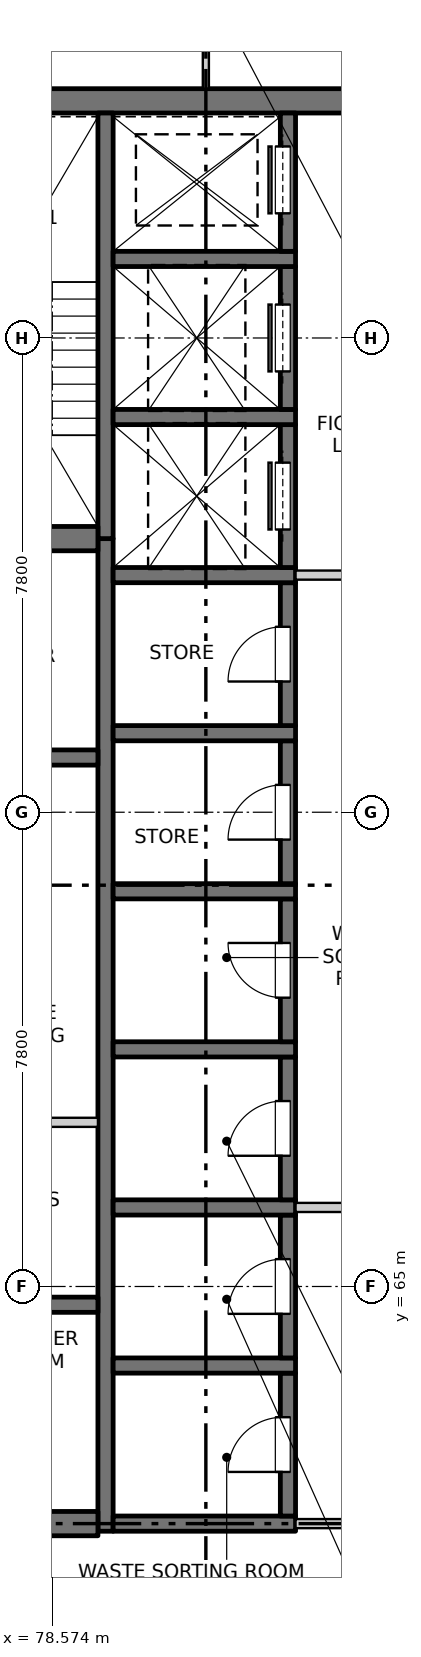
"""IFC4 building model, lengths in metres.
Left out: names, types, materials, properties, quantities, classifications, styles, units other than length and angle.
Written with IfcOpenShell. Run it as: python <this file> out.ifc"""

import sys

from ifc_helpers import new_model, si_unit, direction, frame, frame_2d, origin, place, context, subcontext, project, spatial, rectangle, extrude, element, fill, save


model = new_model("IFC4")
c1 = context("Model", 3, precision=1e-05, world=origin(), true_north=direction((0.0, 1.0)))
c2 = subcontext(c1, "Body", "Model", "MODEL_VIEW")
j1 = project(units=[si_unit("LENGTHUNIT", "METRE"), si_unit("PLANEANGLEUNIT", "RADIAN")], contexts=[c1])
p1 = place(None, origin())
s1 = spatial("IfcSite", under=j1, at=p1, CompositionType="ELEMENT")
p2 = place(p1, origin())
s2 = spatial("IfcBuilding", under=s1, at=p2, CompositionType="ELEMENT")
p3 = place(p2, frame((0.0, 0.0, 224.5)))
s3 = spatial("IfcBuildingStorey", under=s2, at=p3, CompositionType="ELEMENT", Elevation=224.5)
p4 = place(p3, frame((75.45, 84.5, -0.25), z_axis=(0.0, 0.0, 1.0), x_axis=(1.0, 0.0, 0.0)))
e1 = element("IfcWall", 1, at=p4, inside=s3, PredefinedType="SOLIDWALL", context=c2, shape_type="SweptSolid", body=[
    extrude(rectangle(XDim=19.1, YDim=0.4, at=frame_2d((9.55, 0.0))), origin(), (0.0, 0.0, 1.0), 3.4),
])
p5 = place(p3, frame((79.45, 60.975, -0.25), z_axis=(0.0, 0.0, 1.0), x_axis=(0.0, 1.0, 0.0)))
e2 = element("IfcWall", 2, at=p5, inside=s3, PredefinedType="SOLIDWALL", context=c2, shape_type="SweptSolid", body=[
    extrude(rectangle(XDim=16.325, YDim=0.25, at=frame_2d((8.163, 0.0))), origin(), (0.0, 0.0, 1.0), 3.4),
])
p6 = place(p3, frame((79.45, 77.3, -0.25), z_axis=(0.0, 0.0, 1.0), x_axis=(0.0, 1.0, 0.0)))
e3 = element("IfcWall", 3, at=p6, inside=s3, PredefinedType="SOLIDWALL", context=c2, shape_type="SweptSolid", body=[
    extrude(rectangle(XDim=7.0, YDim=0.25, at=frame_2d((3.5, 0.0))), origin(), (0.0, 0.0, 1.0), 3.4),
])
p7 = place(p3, frame((79.575, 61.1, -0.25), z_axis=(0.0, 0.0, 1.0), x_axis=(1.0, 0.0, 0.0)))
e4 = element("IfcWall", 4, at=p7, inside=s3, PredefinedType="SOLIDWALL", context=c2, shape_type="SweptSolid", body=[
    extrude(rectangle(XDim=3.0, YDim=0.25, at=frame_2d((1.5, 0.0))), origin(), (0.0, 0.0, 1.0), 3.4),
])
p8 = place(p3, frame((82.45, 61.225, -0.25), z_axis=(0.0, 0.0, 1.0), x_axis=(0.0, 1.0, 0.0)))
e5 = element("IfcWall", 5, at=p8, inside=s3, PredefinedType="SOLIDWALL", context=c2, shape_type="SweptSolid", body=[
    extrude(rectangle(XDim=2.35, YDim=0.25, at=frame_2d((1.175, 0.0))), origin(), (0.0, 0.0, 1.0), 3.4),
])
p9 = place(p8, frame((0.725, 0.0, 0.25)))
e6 = element("IfcOpeningElement", 6, at=p9, cuts=e5, PredefinedType="OPENING", context=c2, shape_type="SweptSolid", body=[
    extrude(rectangle(XDim=0.9, YDim=2.1, at=frame_2d((0.45, 1.05))), frame((0.0, 0.135, 0.0), z_axis=(0.0, -1.0, 0.0), x_axis=(1.0, 0.0, 0.0)), (0.0, 0.0, 1.0), 0.27),
])
p10 = place(p3, frame((79.575, 63.7, -0.25), z_axis=(0.0, 0.0, 1.0), x_axis=(1.0, 0.0, 0.0)))
e7 = element("IfcWall", 7, at=p10, inside=s3, PredefinedType="SOLIDWALL", context=c2, shape_type="SweptSolid", body=[
    extrude(rectangle(XDim=3.0, YDim=0.25, at=frame_2d((1.5, 0.0))), origin(), (0.0, 0.0, 1.0), 3.4),
])
p11 = place(p3, frame((82.45, 63.825, -0.25), z_axis=(0.0, 0.0, 1.0), x_axis=(0.0, 1.0, 0.0)))
e8 = element("IfcWall", 8, at=p11, inside=s3, PredefinedType="SOLIDWALL", context=c2, shape_type="SweptSolid", body=[
    extrude(rectangle(XDim=2.35, YDim=0.25, at=frame_2d((1.175, 0.0))), origin(), (0.0, 0.0, 1.0), 3.4),
])
p12 = place(p11, frame((0.725, 0.0, 0.25)))
e9 = element("IfcOpeningElement", 9, at=p12, cuts=e8, PredefinedType="OPENING", context=c2, shape_type="SweptSolid", body=[
    extrude(rectangle(XDim=0.9, YDim=2.1, at=frame_2d((0.45, 1.05))), frame((0.0, 0.135, 0.0), z_axis=(0.0, -1.0, 0.0), x_axis=(1.0, 0.0, 0.0)), (0.0, 0.0, 1.0), 0.27),
])
p13 = place(p3, frame((79.575, 66.3, -0.25), z_axis=(0.0, 0.0, 1.0), x_axis=(1.0, 0.0, 0.0)))
e10 = element("IfcWall", 10, at=p13, inside=s3, PredefinedType="SOLIDWALL", context=c2, shape_type="SweptSolid", body=[
    extrude(rectangle(XDim=3.0, YDim=0.25, at=frame_2d((1.5, 0.0))), origin(), (0.0, 0.0, 1.0), 3.4),
])
p14 = place(p3, frame((82.45, 66.425, -0.25), z_axis=(0.0, 0.0, 1.0), x_axis=(0.0, 1.0, 0.0)))
e11 = element("IfcWall", 11, at=p14, inside=s3, PredefinedType="SOLIDWALL", context=c2, shape_type="SweptSolid", body=[
    extrude(rectangle(XDim=2.35, YDim=0.25, at=frame_2d((1.175, 0.0))), origin(), (0.0, 0.0, 1.0), 3.4),
])
p15 = place(p14, frame((0.725, 0.0, 0.25)))
e12 = element("IfcOpeningElement", 12, at=p15, cuts=e11, PredefinedType="OPENING", context=c2, shape_type="SweptSolid", body=[
    extrude(rectangle(XDim=0.9, YDim=2.1, at=frame_2d((0.45, 1.05))), frame((0.0, 0.135, 0.0), z_axis=(0.0, -1.0, 0.0), x_axis=(1.0, 0.0, 0.0)), (0.0, 0.0, 1.0), 0.27),
])
p16 = place(p3, frame((79.575, 68.9, -0.25), z_axis=(0.0, 0.0, 1.0), x_axis=(1.0, 0.0, 0.0)))
e13 = element("IfcWall", 13, at=p16, inside=s3, PredefinedType="SOLIDWALL", context=c2, shape_type="SweptSolid", body=[
    extrude(rectangle(XDim=3.0, YDim=0.25, at=frame_2d((1.5, 0.0))), origin(), (0.0, 0.0, 1.0), 3.4),
])
p17 = place(p3, frame((82.45, 69.025, -0.25), z_axis=(0.0, 0.0, 1.0), x_axis=(0.0, 1.0, 0.0)))
e14 = element("IfcWall", 14, at=p17, inside=s3, PredefinedType="SOLIDWALL", context=c2, shape_type="SweptSolid", body=[
    extrude(rectangle(XDim=2.35, YDim=0.25, at=frame_2d((1.175, 0.0))), origin(), (0.0, 0.0, 1.0), 3.4),
])
p18 = place(p17, frame((0.725, 0.0, 0.25)))
e15 = element("IfcOpeningElement", 15, at=p18, cuts=e14, PredefinedType="OPENING", context=c2, shape_type="SweptSolid", body=[
    extrude(rectangle(XDim=0.9, YDim=2.1, at=frame_2d((0.45, 1.05))), frame((0.0, 0.135, 0.0), z_axis=(0.0, -1.0, 0.0), x_axis=(1.0, 0.0, 0.0)), (0.0, 0.0, 1.0), 0.27),
])
p19 = place(p3, frame((79.575, 71.5, -0.25), z_axis=(0.0, 0.0, 1.0), x_axis=(1.0, 0.0, 0.0)))
e16 = element("IfcWall", 16, at=p19, inside=s3, PredefinedType="SOLIDWALL", context=c2, shape_type="SweptSolid", body=[
    extrude(rectangle(XDim=3.0, YDim=0.25, at=frame_2d((1.5, 0.0))), origin(), (0.0, 0.0, 1.0), 3.4),
])
p20 = place(p3, frame((82.45, 71.625, -0.25), z_axis=(0.0, 0.0, 1.0), x_axis=(0.0, 1.0, 0.0)))
e17 = element("IfcWall", 17, at=p20, inside=s3, PredefinedType="SOLIDWALL", context=c2, shape_type="SweptSolid", body=[
    extrude(rectangle(XDim=2.35, YDim=0.25, at=frame_2d((1.175, 0.0))), origin(), (0.0, 0.0, 1.0), 3.4),
])
p21 = place(p20, frame((0.725, 0.0, 0.25)))
e18 = element("IfcOpeningElement", 18, at=p21, cuts=e17, PredefinedType="OPENING", context=c2, shape_type="SweptSolid", body=[
    extrude(rectangle(XDim=0.9, YDim=2.1, at=frame_2d((0.45, 1.05))), frame((0.0, 0.135, 0.0), z_axis=(0.0, -1.0, 0.0), x_axis=(1.0, 0.0, 0.0)), (0.0, 0.0, 1.0), 0.27),
])
p22 = place(p3, frame((79.575, 74.1, -0.25), z_axis=(0.0, 0.0, 1.0), x_axis=(1.0, 0.0, 0.0)))
e19 = element("IfcWall", 19, at=p22, inside=s3, PredefinedType="SOLIDWALL", context=c2, shape_type="SweptSolid", body=[
    extrude(rectangle(XDim=3.0, YDim=0.25, at=frame_2d((1.5, 0.0))), origin(), (0.0, 0.0, 1.0), 3.4),
])
p23 = place(p3, frame((82.45, 74.225, -0.25), z_axis=(0.0, 0.0, 1.0), x_axis=(0.0, 1.0, 0.0)))
e20 = element("IfcWall", 20, at=p23, inside=s3, PredefinedType="SOLIDWALL", context=c2, shape_type="SweptSolid", body=[
    extrude(rectangle(XDim=2.35, YDim=0.25, at=frame_2d((1.175, 0.0))), origin(), (0.0, 0.0, 1.0), 3.4),
])
p24 = place(p23, frame((0.725, 0.0, 0.25)))
e21 = element("IfcOpeningElement", 21, at=p24, cuts=e20, PredefinedType="OPENING", context=c2, shape_type="SweptSolid", body=[
    extrude(rectangle(XDim=0.9, YDim=2.1, at=frame_2d((0.45, 1.05))), frame((0.0, 0.135, 0.0), z_axis=(0.0, -1.0, 0.0), x_axis=(1.0, 0.0, 0.0)), (0.0, 0.0, 1.0), 0.27),
])
p25 = place(p3, frame((79.575, 76.7, -0.25), z_axis=(0.0, 0.0, 1.0), x_axis=(1.0, 0.0, 0.0)))
e22 = element("IfcWall", 22, at=p25, inside=s3, PredefinedType="SOLIDWALL", context=c2, shape_type="SweptSolid", body=[
    extrude(rectangle(XDim=3.0, YDim=0.25, at=frame_2d((1.5, 0.0))), origin(), (0.0, 0.0, 1.0), 3.4),
])
p26 = place(p3, frame((82.45, 76.825, -0.25), z_axis=(0.0, 0.0, 1.0), x_axis=(0.0, 1.0, 0.0)))
e23 = element("IfcWall", 23, at=p26, inside=s3, PredefinedType="SOLIDWALL", context=c2, shape_type="SweptSolid", body=[
    extrude(rectangle(XDim=2.35, YDim=0.25, at=frame_2d((1.175, 0.0))), origin(), (0.0, 0.0, 1.0), 3.4),
])
p27 = place(p26, frame((0.625, 0.0, 0.25)))
e24 = element("IfcOpeningElement", 24, at=p27, cuts=e23, PredefinedType="OPENING", context=c2, shape_type="SweptSolid", body=[
    extrude(rectangle(XDim=1.1, YDim=2.1, at=frame_2d((0.55, 1.05))), frame((0.0, 0.135, 0.0), z_axis=(0.0, -1.0, 0.0), x_axis=(1.0, 0.0, 0.0)), (0.0, 0.0, 1.0), 0.27),
])
p28 = place(p3, frame((79.575, 79.3, -0.25), z_axis=(0.0, 0.0, 1.0), x_axis=(1.0, 0.0, 0.0)))
e25 = element("IfcWall", 25, at=p28, inside=s3, PredefinedType="SOLIDWALL", context=c2, shape_type="SweptSolid", body=[
    extrude(rectangle(XDim=3.0, YDim=0.25, at=frame_2d((1.5, 0.0))), origin(), (0.0, 0.0, 1.0), 3.4),
])
p29 = place(p3, frame((82.45, 79.425, -0.25), z_axis=(0.0, 0.0, 1.0), x_axis=(0.0, 1.0, 0.0)))
e26 = element("IfcWall", 26, at=p29, inside=s3, PredefinedType="SOLIDWALL", context=c2, shape_type="SweptSolid", body=[
    extrude(rectangle(XDim=2.35, YDim=0.25, at=frame_2d((1.175, 0.0))), origin(), (0.0, 0.0, 1.0), 3.4),
])
p30 = place(p29, frame((0.625, 0.0, 0.25)))
e27 = element("IfcOpeningElement", 27, at=p30, cuts=e26, PredefinedType="OPENING", context=c2, shape_type="SweptSolid", body=[
    extrude(rectangle(XDim=1.1, YDim=2.1, at=frame_2d((0.55, 1.05))), frame((0.0, 0.135, 0.0), z_axis=(0.0, -1.0, 0.0), x_axis=(1.0, 0.0, 0.0)), (0.0, 0.0, 1.0), 0.27),
])
p31 = place(p3, frame((79.575, 81.9, -0.25), z_axis=(0.0, 0.0, 1.0), x_axis=(1.0, 0.0, 0.0)))
e28 = element("IfcWall", 28, at=p31, inside=s3, PredefinedType="SOLIDWALL", context=c2, shape_type="SweptSolid", body=[
    extrude(rectangle(XDim=3.0, YDim=0.25, at=frame_2d((1.5, 0.0))), origin(), (0.0, 0.0, 1.0), 3.4),
])
p32 = place(p3, frame((82.45, 82.025, -0.25), z_axis=(0.0, 0.0, 1.0), x_axis=(0.0, 1.0, 0.0)))
e29 = element("IfcWall", 29, at=p32, inside=s3, PredefinedType="SOLIDWALL", context=c2, shape_type="SweptSolid", body=[
    extrude(rectangle(XDim=2.275, YDim=0.25, at=frame_2d((1.138, 0.0))), origin(), (0.0, 0.0, 1.0), 3.4),
])
p33 = place(p32, frame((0.625, 0.0, 0.25)))
e30 = element("IfcOpeningElement", 30, at=p33, cuts=e29, PredefinedType="OPENING", context=c2, shape_type="SweptSolid", body=[
    extrude(rectangle(XDim=1.1, YDim=2.1, at=frame_2d((0.55, 1.05))), frame((0.0, 0.135, 0.0), z_axis=(0.0, -1.0, 0.0), x_axis=(1.0, 0.0, 0.0)), (0.0, 0.0, 1.0), 0.27),
])
p34 = place(p3, frame((75.45, 61.1, -0.25), z_axis=(0.0, 0.0, 1.0), x_axis=(1.0, 0.0, 0.0)))
e31 = element("IfcWall", 31, at=p34, inside=s3, PredefinedType="SOLIDWALL", context=c2, shape_type="SweptSolid", body=[
    extrude(rectangle(XDim=3.875, YDim=0.4, at=frame_2d((1.938, 0.0))), origin(), (0.0, 0.0, 1.0), 3.4),
])
for number, where, z_axis, x_axis in (
    (32, (75.45, 64.7, -0.25), (0.0, 0.0, 1.0), (1.0, 0.0, 0.0)),
    (33, (75.45, 73.7, -0.25), (0.0, 0.0, 1.0), (1.0, 0.0, 0.0)),
):
    element("IfcWall", number, at=place(p3, frame(where, z_axis=z_axis, x_axis=x_axis)), inside=s3, PredefinedType="SOLIDWALL", context=c2, shape_type="SweptSolid", body=[
        extrude(rectangle(XDim=3.875, YDim=0.25, at=frame_2d((1.938, 0.0))), origin(), (0.0, 0.0, 1.0), 3.4),
    ])
p35 = place(p3, frame((75.45, 77.3, -0.25), z_axis=(0.0, 0.0, 1.0), x_axis=(1.0, 0.0, 0.0)))
e34 = element("IfcWall", 34, at=p35, inside=s3, PredefinedType="SOLIDWALL", context=c2, shape_type="SweptSolid", body=[
    extrude(rectangle(XDim=3.875, YDim=0.4, at=frame_2d((1.938, 0.0))), origin(), (0.0, 0.0, 1.0), 3.4),
])
p36 = place(p3, frame((82.575, 61.1, 0.0), z_axis=(0.0, 0.0, 1.0), x_axis=(1.0, 0.0, 0.0)))
e35 = element("IfcWall", 35, at=p36, inside=s3, PredefinedType="PARTITIONING", context=c2, shape_type="SweptSolid", body=[
    extrude(rectangle(XDim=4.85, YDim=0.15, at=frame_2d((2.425, 0.0))), origin(), (0.0, 0.0, 1.0), 3.15),
])
p37 = place(p36, frame((1.525, 0.0, 0.0)))
e36 = element("IfcOpeningElement", 36, at=p37, cuts=e35, PredefinedType="OPENING", context=c2, shape_type="SweptSolid", body=[
    extrude(rectangle(XDim=1.8, YDim=2.1, at=frame_2d((0.9, 1.05))), frame((0.0, 0.085, 0.0), z_axis=(0.0, -1.0, 0.0), x_axis=(1.0, 0.0, 0.0)), (0.0, 0.0, 1.0), 0.17),
])
p38 = place(p3, frame((82.575, 66.3, 0.0), z_axis=(0.0, 0.0, 1.0), x_axis=(1.0, 0.0, 0.0)))
e37 = element("IfcWall", 37, at=p38, inside=s3, PredefinedType="PARTITIONING", context=c2, shape_type="SweptSolid", body=[
    extrude(rectangle(XDim=4.85, YDim=0.15, at=frame_2d((2.425, 0.0))), origin(), (0.0, 0.0, 1.0), 3.15),
])
p39 = place(p38, frame((1.525, 0.0, 0.0)))
e38 = element("IfcOpeningElement", 38, at=p39, cuts=e37, PredefinedType="OPENING", context=c2, shape_type="SweptSolid", body=[
    extrude(rectangle(XDim=1.8, YDim=2.1, at=frame_2d((0.9, 1.05))), frame((0.0, 0.085, 0.0), z_axis=(0.0, -1.0, 0.0), x_axis=(1.0, 0.0, 0.0)), (0.0, 0.0, 1.0), 0.17),
])
p40 = place(p3, frame((75.45, 67.7, 0.0), z_axis=(0.0, 0.0, 1.0), x_axis=(1.0, 0.0, 0.0)))
e39 = element("IfcWall", 39, at=p40, inside=s3, PredefinedType="PARTITIONING", context=c2, shape_type="SweptSolid", body=[
    extrude(rectangle(XDim=3.875, YDim=0.15, at=frame_2d((1.938, 0.0))), origin(), (0.0, 0.0, 1.0), 3.15),
])
p41 = place(p3, frame((82.575, 76.7, 0.0), z_axis=(0.0, 0.0, 1.0), x_axis=(1.0, 0.0, 0.0)))
e40 = element("IfcWall", 40, at=p41, inside=s3, PredefinedType="PARTITIONING", context=c2, shape_type="SweptSolid", body=[
    extrude(rectangle(XDim=4.85, YDim=0.15, at=frame_2d((2.425, 0.0))), origin(), (0.0, 0.0, 1.0), 3.15),
])
p42 = place(p41, frame((1.525, 0.0, 0.0)))
e41 = element("IfcOpeningElement", 41, at=p42, cuts=e40, PredefinedType="OPENING", context=c2, shape_type="SweptSolid", body=[
    extrude(rectangle(XDim=1.8, YDim=2.1, at=frame_2d((0.9, 1.05))), frame((0.0, 0.085, 0.0), z_axis=(0.0, -1.0, 0.0), x_axis=(1.0, 0.0, 0.0)), (0.0, 0.0, 1.0), 0.17),
])
p43 = place(p3, frame((81.1, 84.7, 0.0), z_axis=(0.0, 0.0, 1.0), x_axis=(0.0, 1.0, 0.0)))
e42 = element("IfcWall", 42, at=p43, inside=s3, PredefinedType="PARTITIONING", context=c2, shape_type="SweptSolid", body=[
    extrude(rectangle(XDim=3.4, YDim=0.1, at=frame_2d((1.7, 0.0))), origin(), (0.0, 0.0, 1.0), 3.15),
])
p44 = place(p43, frame((1.3, 0.0, 0.0)))
e43 = element("IfcOpeningElement", 43, at=p44, cuts=e42, PredefinedType="OPENING", context=c2, shape_type="SweptSolid", body=[
    extrude(rectangle(XDim=0.9, YDim=2.1, at=frame_2d((0.45, 1.05))), frame((0.0, 0.06, 0.0), z_axis=(0.0, -1.0, 0.0), x_axis=(1.0, 0.0, 0.0)), (0.0, 0.0, 1.0), 0.12),
])
p45 = place(p9, origin())
e44 = element("IfcDoor", 44, at=p45, inside=s3, OperationType="SINGLE_SWING_LEFT", PredefinedType="DOOR", context=c2, shape_type="SweptSolid", body=[
    extrude(rectangle(XDim=0.9, YDim=2.1, at=frame_2d((0.45, 1.05))), frame((0.0, 0.11, 0.0), z_axis=(0.0, -1.0, 0.0), x_axis=(1.0, 0.0, 0.0)), (0.0, 0.0, 1.0), 0.05),
])
fill(e6, e44)
p46 = place(p12, origin())
e45 = element("IfcDoor", 45, at=p46, inside=s3, OperationType="SINGLE_SWING_LEFT", PredefinedType="DOOR", context=c2, shape_type="SweptSolid", body=[
    extrude(rectangle(XDim=0.9, YDim=2.1, at=frame_2d((0.45, 1.05))), frame((0.0, 0.11, 0.0), z_axis=(0.0, -1.0, 0.0), x_axis=(1.0, 0.0, 0.0)), (0.0, 0.0, 1.0), 0.05),
])
fill(e9, e45)
p47 = place(p15, origin())
e46 = element("IfcDoor", 46, at=p47, inside=s3, OperationType="SINGLE_SWING_LEFT", PredefinedType="DOOR", context=c2, shape_type="SweptSolid", body=[
    extrude(rectangle(XDim=0.9, YDim=2.1, at=frame_2d((0.45, 1.05))), frame((0.0, 0.11, 0.0), z_axis=(0.0, -1.0, 0.0), x_axis=(1.0, 0.0, 0.0)), (0.0, 0.0, 1.0), 0.05),
])
fill(e12, e46)
p48 = place(p18, origin())
e47 = element("IfcDoor", 47, at=p48, inside=s3, OperationType="SINGLE_SWING_RIGHT", PredefinedType="DOOR", context=c2, shape_type="SweptSolid", body=[
    extrude(rectangle(XDim=0.9, YDim=2.1, at=frame_2d((0.45, 1.05))), frame((0.0, 0.11, 0.0), z_axis=(0.0, -1.0, 0.0), x_axis=(1.0, 0.0, 0.0)), (0.0, 0.0, 1.0), 0.05),
])
fill(e15, e47)
p49 = place(p21, origin())
e48 = element("IfcDoor", 48, at=p49, inside=s3, OperationType="SINGLE_SWING_LEFT", PredefinedType="DOOR", context=c2, shape_type="SweptSolid", body=[
    extrude(rectangle(XDim=0.9, YDim=2.1, at=frame_2d((0.45, 1.05))), frame((0.0, 0.11, 0.0), z_axis=(0.0, -1.0, 0.0), x_axis=(1.0, 0.0, 0.0)), (0.0, 0.0, 1.0), 0.05),
])
fill(e18, e48)
p50 = place(p24, origin())
e49 = element("IfcDoor", 49, at=p50, inside=s3, OperationType="SINGLE_SWING_LEFT", PredefinedType="DOOR", context=c2, shape_type="SweptSolid", body=[
    extrude(rectangle(XDim=0.9, YDim=2.1, at=frame_2d((0.45, 1.05))), frame((0.0, 0.11, 0.0), z_axis=(0.0, -1.0, 0.0), x_axis=(1.0, 0.0, 0.0)), (0.0, 0.0, 1.0), 0.05),
])
fill(e21, e49)
p51 = place(p27, origin())
e50 = element("IfcDoor", 50, at=p51, inside=s3, OperationType="SLIDING_TO_LEFT", PredefinedType="DOOR", context=c2, shape_type="SweptSolid", body=[
    extrude(rectangle(XDim=1.1, YDim=2.1, at=frame_2d((0.55, 1.05))), frame((0.0, 0.11, 0.0), z_axis=(0.0, -1.0, 0.0), x_axis=(1.0, 0.0, 0.0)), (0.0, 0.0, 1.0), 0.05),
])
fill(e24, e50)
p52 = place(p30, origin())
e51 = element("IfcDoor", 51, at=p52, inside=s3, OperationType="SLIDING_TO_LEFT", PredefinedType="DOOR", context=c2, shape_type="SweptSolid", body=[
    extrude(rectangle(XDim=1.1, YDim=2.1, at=frame_2d((0.55, 1.05))), frame((0.0, 0.11, 0.0), z_axis=(0.0, -1.0, 0.0), x_axis=(1.0, 0.0, 0.0)), (0.0, 0.0, 1.0), 0.05),
])
fill(e27, e51)
p53 = place(p33, origin())
e52 = element("IfcDoor", 52, at=p53, inside=s3, OperationType="SLIDING_TO_RIGHT", PredefinedType="DOOR", context=c2, shape_type="SweptSolid", body=[
    extrude(rectangle(XDim=1.1, YDim=2.1, at=frame_2d((0.55, 1.05))), frame((0.0, 0.11, 0.0), z_axis=(0.0, -1.0, 0.0), x_axis=(1.0, 0.0, 0.0)), (0.0, 0.0, 1.0), 0.05),
])
fill(e30, e52)
save(model, sys.argv[1])
